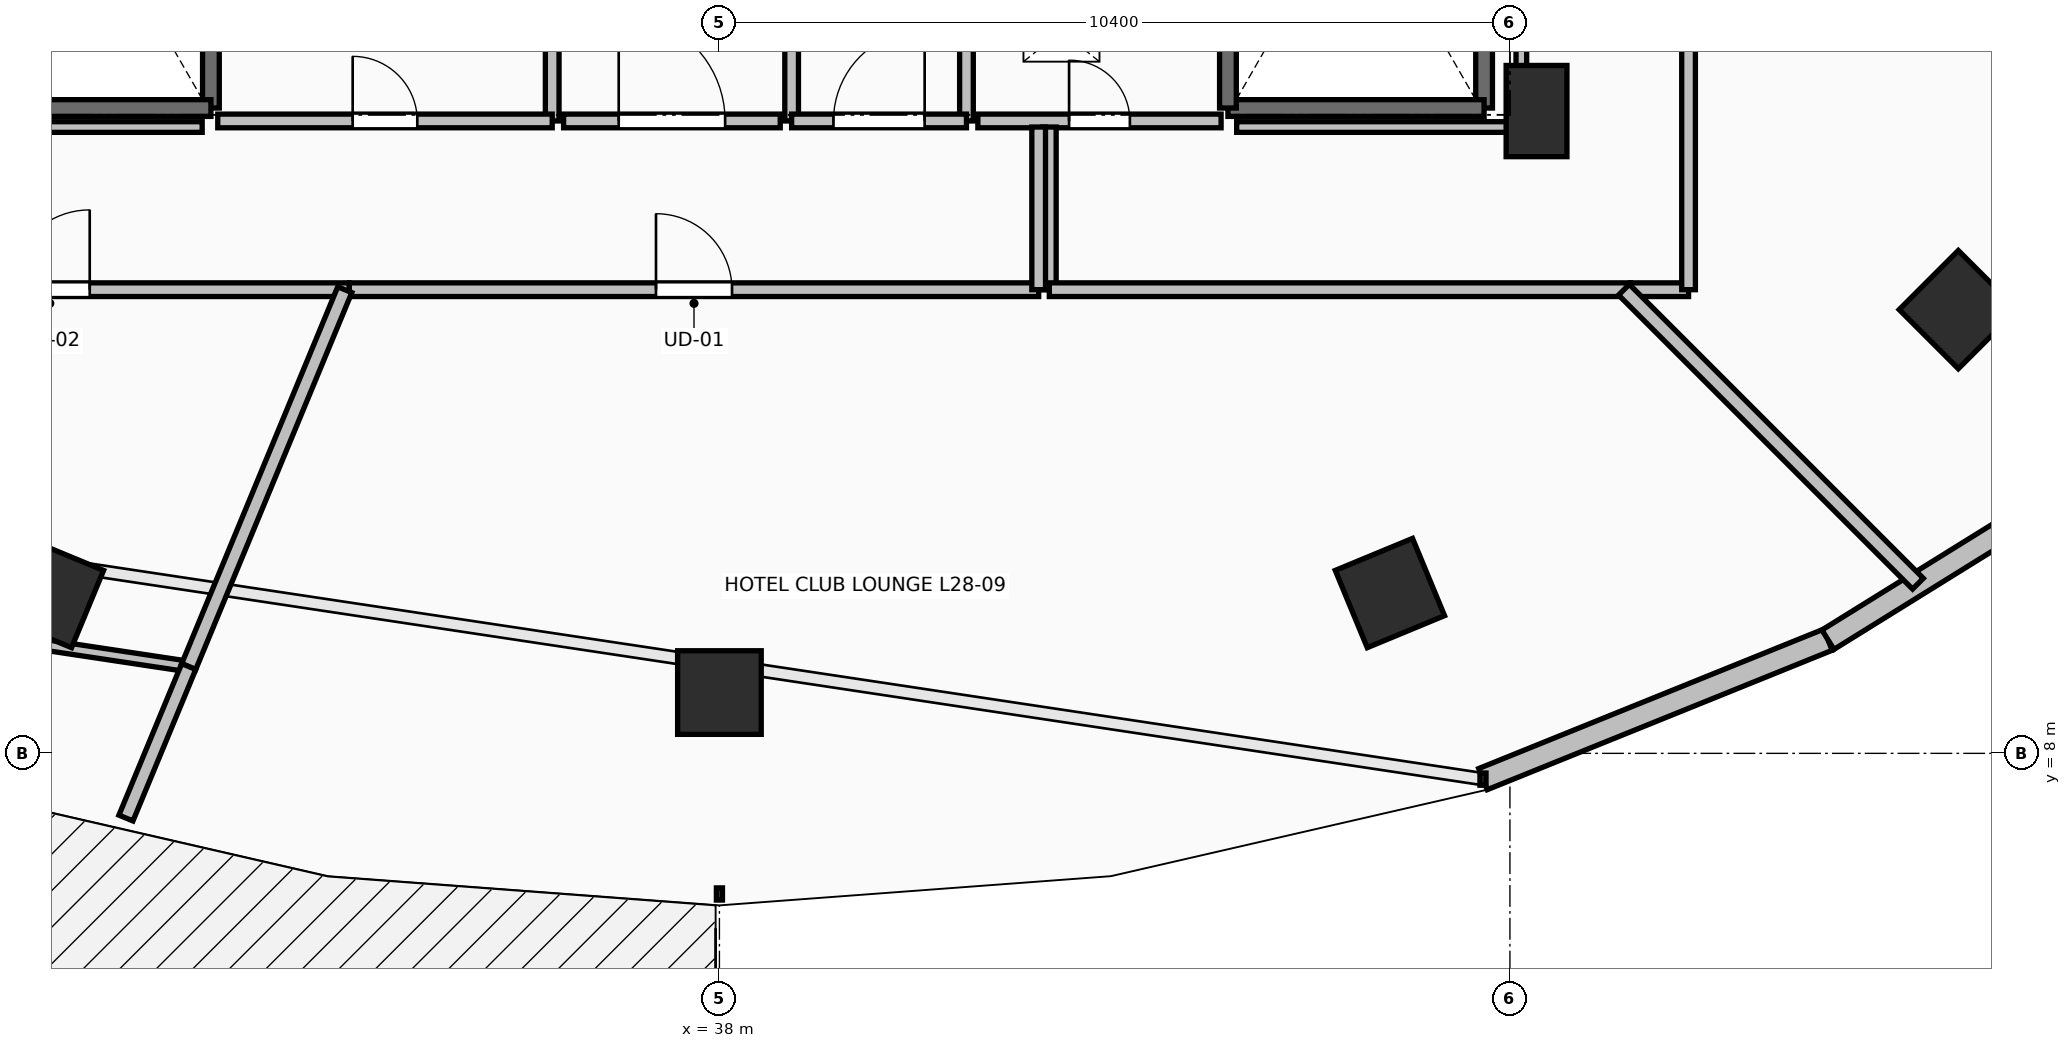
"""IFC4 building model, lengths in metres.
Left out: names, types, materials, properties, quantities, classifications, styles, units other than length and angle.
Written with IfcOpenShell. Run it as: python <this file> out.ifc"""

import sys

from ifc_helpers import new_model, si_unit, direction, frame, frame_2d, origin, origin_2d, place, context, subcontext, project, spatial, rectangle, extrude, element, fill, save


model = new_model("IFC4")
c1 = context("Model", 3, precision=1e-05, world=origin(), true_north=direction((0.0, 1.0)))
c2 = subcontext(c1, "Body", "Model", "MODEL_VIEW")
j1 = project(units=[si_unit("LENGTHUNIT", "METRE"), si_unit("PLANEANGLEUNIT", "RADIAN")], contexts=[c1])
p1 = place(None, origin())
s1 = spatial("IfcSite", under=j1, at=p1, CompositionType="ELEMENT")
p2 = place(p1, origin())
s2 = spatial("IfcBuilding", under=s1, at=p2, CompositionType="ELEMENT")
p3 = place(p2, frame((0.0, 0.0, 106.8)))
s3 = spatial("IfcBuildingStorey", under=s2, at=p3, CompositionType="ELEMENT", Elevation=106.8)
for number, where, z_axis, x_axis in (
    (1, (29.179, 10.109, 0.0), (0.0, 0.0, 1.0), (-0.383, -0.924, 0.0)),
    (2, (38.0, 8.8, 0.0), (0.0, 0.0, 1.0), (0.0, -1.0, 0.0)),
    (3, (46.821, 10.109, 0.0), (0.0, 0.0, 1.0), (0.383, -0.924, 0.0)),
    (4, (54.299, 13.838, 0.0), (0.0, 0.0, 1.0), (0.707, -0.707, 0.0)),
):
    element("IfcColumn", number, at=place(p3, frame(where, z_axis=z_axis, x_axis=x_axis)), inside=s3, PredefinedType="COLUMN", context=c2, shape_type="SweptSolid", body=[
        extrude(rectangle(XDim=1.1, YDim=1.1, at=origin_2d()), origin(), (0.0, 0.0, 1.0), 3.5),
    ])
p4 = place(p3, frame((48.75, 16.45, 0.0), z_axis=(0.0, 0.0, 1.0), x_axis=(1.0, 0.0, 0.0)))
e5 = element("IfcColumn", 5, at=p4, inside=s3, PredefinedType="PILASTER", context=c2, shape_type="SweptSolid", body=[
    extrude(rectangle(XDim=0.8, YDim=1.2, at=origin_2d()), origin(), (0.0, 0.0, 1.0), 3.5),
])
p5 = place(p3, frame((48.045, 7.661, 0.0), z_axis=(0.0, 0.0, 1.0), x_axis=(0.927122233109, 0.374759075775, 0.0)))
e6 = element("IfcWall", 6, at=p5, inside=s3, PredefinedType="STANDARD", context=c2, shape_type="SweptSolid", body=[
    extrude(rectangle(XDim=4.895, YDim=0.3, at=frame_2d((2.448, 0.0))), origin(), (0.0, 0.0, 1.0), 3.24),
])
p6 = place(p3, frame((52.584, 9.495, 0.0), z_axis=(0.0, 0.0, 1.0), x_axis=(0.849684479743, 0.527291461038, 0.0)))
e7 = element("IfcWall", 7, at=p6, inside=s3, PredefinedType="STANDARD", context=c2, shape_type="SweptSolid", body=[
    extrude(rectangle(XDim=4.681, YDim=0.3, at=frame_2d((2.341, 0.0))), origin(), (0.0, 0.0, 1.0), 3.24),
])
p7 = place(p3, frame((31.31, 23.91, 0.0), z_axis=(0.0, 0.0, 1.0), x_axis=(0.0, -1.0, 0.0)))
e8 = element("IfcWall", 8, at=p7, inside=s3, PredefinedType="SOLIDWALL", context=c2, shape_type="SweptSolid", body=[
    extrude(rectangle(XDim=7.42, YDim=0.22, at=frame_2d((3.71, 0.0))), origin(), (0.0, 0.0, 1.0), 3.24),
])
p8 = place(p3, frame((31.31, 16.49, 0.0), z_axis=(0.0, 0.0, 1.0), x_axis=(-1.0, 0.0, 0.0)))
e9 = element("IfcWall", 9, at=p8, inside=s3, PredefinedType="SOLIDWALL", context=c2, shape_type="SweptSolid", body=[
    extrude(rectangle(XDim=3.37, YDim=0.22, at=frame_2d((1.685, 0.0))), origin(), (0.0, 0.0, 1.0), 3.24),
])
p9 = place(p3, frame((48.06, 23.91, 0.0), z_axis=(0.0, 0.0, 1.0), x_axis=(0.0, -1.0, 0.0)))
e10 = element("IfcWall", 10, at=p9, inside=s3, PredefinedType="SOLIDWALL", context=c2, shape_type="SweptSolid", body=[
    extrude(rectangle(XDim=7.42, YDim=0.22, at=frame_2d((3.71, 0.0))), origin(), (0.0, 0.0, 1.0), 3.24),
])
p10 = place(p3, frame((48.06, 16.49, 0.0), z_axis=(0.0, 0.0, 1.0), x_axis=(-1.0, 0.0, 0.0)))
e11 = element("IfcWall", 11, at=p10, inside=s3, PredefinedType="SOLIDWALL", context=c2, shape_type="SweptSolid", body=[
    extrude(rectangle(XDim=3.37, YDim=0.22, at=frame_2d((1.685, 0.0))), origin(), (0.0, 0.0, 1.0), 3.24),
])
p11 = place(p3, frame((44.69, 16.49, 0.0), z_axis=(0.0, 0.0, 1.0), x_axis=(0.0, 1.0, 0.0)))
e12 = element("IfcWall", 12, at=p11, inside=s3, PredefinedType="SOLIDWALL", context=c2, shape_type="SweptSolid", body=[
    extrude(rectangle(XDim=7.42, YDim=0.22, at=frame_2d((3.71, 0.0))), origin(), (0.0, 0.0, 1.0), 3.24),
])
p12 = place(p3, frame((41.25, 16.32, 0.0), z_axis=(0.0, 0.0, 1.0), x_axis=(0.0, 1.0, 0.0)))
e13 = element("IfcWall", 13, at=p12, inside=s3, PredefinedType="PARTITIONING", context=c2, shape_type="SweptSolid", body=[
    extrude(rectangle(XDim=3.985, YDim=0.18, at=frame_2d((1.992, 0.0))), origin(), (0.0, 0.0, 1.0), 3.24),
])
p13 = place(p12, frame((1.593, 0.0, 0.0)))
e14 = element("IfcOpeningElement", 14, at=p13, cuts=e13, PredefinedType="OPENING", context=c2, shape_type="SweptSolid", body=[
    extrude(rectangle(XDim=0.8, YDim=2.05, at=frame_2d((0.4, 1.025))), frame((0.0, 0.105, 0.0), z_axis=(0.0, -1.0, 0.0), x_axis=(1.0, 0.0, 0.0)), (0.0, 0.0, 1.0), 0.21),
])
p14 = place(p3, frame((38.95, 21.755, 0.0), z_axis=(0.0, 0.0, 1.0), x_axis=(0.0, -1.0, 0.0)))
e15 = element("IfcWall", 15, at=p14, inside=s3, PredefinedType="PARTITIONING", context=c2, shape_type="SweptSolid", body=[
    extrude(rectangle(XDim=5.435, YDim=0.18, at=frame_2d((2.717, 0.0))), origin(), (0.0, 0.0, 1.0), 3.24),
])
p15 = place(p14, frame((2.018, 0.0, 0.0)))
e16 = element("IfcOpeningElement", 16, at=p15, cuts=e15, PredefinedType="OPENING", context=c2, shape_type="SweptSolid", body=[
    extrude(rectangle(XDim=1.4, YDim=2.2, at=frame_2d((0.7, 1.1))), frame((0.0, 0.105, 0.0), z_axis=(0.0, -1.0, 0.0), x_axis=(1.0, 0.0, 0.0)), (0.0, 0.0, 1.0), 0.21),
])
p16 = place(p3, frame((38.95, 16.32, 0.0), z_axis=(0.0, 0.0, 1.0), x_axis=(1.0, 0.0, 0.0)))
e17 = element("IfcWall", 17, at=p16, inside=s3, PredefinedType="PARTITIONING", context=c2, shape_type="SweptSolid", body=[
    extrude(rectangle(XDim=2.3, YDim=0.18, at=frame_2d((1.15, 0.0))), origin(), (0.0, 0.0, 1.0), 3.24),
])
p17 = place(p16, frame((0.55, 0.0, 0.0)))
e18 = element("IfcOpeningElement", 18, at=p17, cuts=e17, PredefinedType="OPENING", context=c2, shape_type="SweptSolid", body=[
    extrude(rectangle(XDim=1.2, YDim=2.15, at=frame_2d((0.6, 1.075))), frame((0.0, 0.105, 0.0), z_axis=(0.0, -1.0, 0.0), x_axis=(1.0, 0.0, 0.0)), (0.0, 0.0, 1.0), 0.21),
])
p18 = place(p3, frame((41.4, 16.32, 0.0), z_axis=(0.0, 0.0, 1.0), x_axis=(1.0, 0.0, 0.0)))
e19 = element("IfcWall", 19, at=p18, inside=s3, PredefinedType="PARTITIONING", context=c2, shape_type="SweptSolid", body=[
    extrude(rectangle(XDim=3.2, YDim=0.18, at=frame_2d((1.6, 0.0))), origin(), (0.0, 0.0, 1.0), 3.24),
])
p19 = place(p18, frame((1.2, 0.0, 0.0)))
e20 = element("IfcOpeningElement", 20, at=p19, cuts=e19, PredefinedType="OPENING", context=c2, shape_type="SweptSolid", body=[
    extrude(rectangle(XDim=0.8, YDim=2.05, at=frame_2d((0.4, 1.025))), frame((0.0, 0.105, 0.0), z_axis=(0.0, -1.0, 0.0), x_axis=(1.0, 0.0, 0.0)), (0.0, 0.0, 1.0), 0.21),
])
p20 = place(p3, frame((35.8, 16.32, 0.0), z_axis=(0.0, 0.0, 1.0), x_axis=(0.0, 1.0, 0.0)))
e21 = element("IfcWall", 21, at=p20, inside=s3, PredefinedType="PARTITIONING", context=c2, shape_type="SweptSolid", body=[
    extrude(rectangle(XDim=5.13, YDim=0.18, at=frame_2d((2.565, 0.0))), origin(), (0.0, 0.0, 1.0), 3.24),
])
p21 = place(p3, frame((31.4, 16.32, 0.0), z_axis=(0.0, 0.0, 1.0), x_axis=(1.0, 0.0, 0.0)))
e22 = element("IfcWall", 22, at=p21, inside=s3, PredefinedType="PARTITIONING", context=c2, shape_type="SweptSolid", body=[
    extrude(rectangle(XDim=4.4, YDim=0.18, at=frame_2d((2.2, 0.0))), origin(), (0.0, 0.0, 1.0), 3.24),
])
p22 = place(p21, frame((1.775, 0.0, 0.0)))
e23 = element("IfcOpeningElement", 23, at=p22, cuts=e22, PredefinedType="OPENING", context=c2, shape_type="SweptSolid", body=[
    extrude(rectangle(XDim=0.85, YDim=2.1, at=frame_2d((0.425, 1.05))), frame((0.0, 0.105, 0.0), z_axis=(0.0, -1.0, 0.0), x_axis=(1.0, 0.0, 0.0)), (0.0, 0.0, 1.0), 0.21),
])
p23 = place(p3, frame((35.95, 16.32, 0.0), z_axis=(0.0, 0.0, 1.0), x_axis=(1.0, 0.0, 0.0)))
e24 = element("IfcWall", 24, at=p23, inside=s3, PredefinedType="PARTITIONING", context=c2, shape_type="SweptSolid", body=[
    extrude(rectangle(XDim=2.85, YDim=0.18, at=frame_2d((1.425, 0.0))), origin(), (0.0, 0.0, 1.0), 3.24),
])
p24 = place(p23, frame((0.725, 0.0, 0.0)))
e25 = element("IfcOpeningElement", 25, at=p24, cuts=e24, PredefinedType="OPENING", context=c2, shape_type="SweptSolid", body=[
    extrude(rectangle(XDim=1.4, YDim=2.2, at=frame_2d((0.7, 1.1))), frame((0.0, 0.105, 0.0), z_axis=(0.0, -1.0, 0.0), x_axis=(1.0, 0.0, 0.0)), (0.0, 0.0, 1.0), 0.21),
])
p25 = place(p3, frame((25.25, 14.1, 0.0), z_axis=(0.0, 0.0, 1.0), x_axis=(1.0, 0.0, 0.0)))
e26 = element("IfcWall", 26, at=p25, inside=s3, PredefinedType="PARTITIONING", context=c2, shape_type="SweptSolid", body=[
    extrude(rectangle(XDim=7.881, YDim=0.18, at=frame_2d((3.94, 0.0))), origin(), (0.0, 0.0, 1.0), 2.432),
])
p26 = place(p25, frame((3.416, 0.0, 0.0)))
e27 = element("IfcOpeningElement", 27, at=p26, cuts=e26, PredefinedType="OPENING", context=c2, shape_type="SweptSolid", body=[
    extrude(rectangle(XDim=1.05, YDim=2.2, at=frame_2d((0.525, 1.1))), frame((0.0, 0.105, 0.0), z_axis=(0.0, -1.0, 0.0), x_axis=(1.0, 0.0, 0.0)), (0.0, 0.0, 1.0), 0.21),
])
p27 = place(p3, frame((42.34, 16.24, 0.0), z_axis=(0.0, 0.0, 1.0), x_axis=(0.0, -1.0, 0.0)))
e28 = element("IfcWall", 28, at=p27, inside=s3, PredefinedType="PARTITIONING", context=c2, shape_type="SweptSolid", body=[
    extrude(rectangle(XDim=2.14, YDim=0.18, at=frame_2d((1.07, 0.0))), origin(), (0.0, 0.0, 1.0), 3.24),
])
p28 = place(p3, frame((42.34, 14.1, 0.0), z_axis=(0.0, 0.0, 1.0), x_axis=(1.0, 0.0, 0.0)))
e29 = element("IfcWall", 29, at=p28, inside=s3, PredefinedType="PARTITIONING", context=c2, shape_type="SweptSolid", body=[
    extrude(rectangle(XDim=7.645, YDim=0.18, at=frame_2d((3.823, 0.0))), origin(), (0.0, 0.0, 1.0), 2.432),
])
p29 = place(p3, frame((33.131, 14.1, 0.0), z_axis=(0.0, 0.0, 1.0), x_axis=(1.0, 0.0, 0.0)))
e30 = element("IfcWall", 30, at=p29, inside=s3, PredefinedType="PARTITIONING", context=c2, shape_type="SweptSolid", body=[
    extrude(rectangle(XDim=9.069, YDim=0.18, at=frame_2d((4.534, 0.0))), origin(), (0.0, 0.0, 1.0), 2.886),
])
p30 = place(p29, frame((4.034, 0.0, 0.0)))
e31 = element("IfcOpeningElement", 31, at=p30, cuts=e30, PredefinedType="OPENING", context=c2, shape_type="SweptSolid", body=[
    extrude(rectangle(XDim=1.0, YDim=2.15, at=frame_2d((0.5, 1.075))), frame((0.0, 0.105, 0.0), z_axis=(0.0, -1.0, 0.0), x_axis=(1.0, 0.0, 0.0)), (0.0, 0.0, 1.0), 0.21),
])
p31 = place(p3, frame((42.2, 14.1, 0.0), z_axis=(0.0, 0.0, 1.0), x_axis=(0.0, 1.0, 0.0)))
e32 = element("IfcWall", 32, at=p31, inside=s3, PredefinedType="PARTITIONING", context=c2, shape_type="SweptSolid", body=[
    extrude(rectangle(XDim=2.14, YDim=0.18, at=frame_2d((1.07, 0.0))), origin(), (0.0, 0.0, 1.0), 3.24),
])
p32 = place(p3, frame((49.985, 14.1, 0.0), z_axis=(0.0, 0.0, 1.0), x_axis=(1.0, 0.0, 0.0)))
e33 = element("IfcWall", 33, at=p32, inside=s3, PredefinedType="PARTITIONING", context=c2, shape_type="SweptSolid", body=[
    extrude(rectangle(XDim=0.765, YDim=0.18, at=frame_2d((0.382, 0.0))), origin(), (0.0, 0.0, 1.0), 2.972),
])
p33 = place(p3, frame((50.75, 14.1, 0.0), z_axis=(0.0, 0.0, 1.0), x_axis=(0.0, 1.0, 0.0)))
e34 = element("IfcWall", 34, at=p33, inside=s3, PredefinedType="PARTITIONING", context=c2, shape_type="SweptSolid", body=[
    extrude(rectangle(XDim=16.981, YDim=0.18, at=frame_2d((8.49, 0.0))), origin(), (0.0, 0.0, 1.0), 2.432),
])
p34 = place(p33, frame((7.99, 0.0, 0.0)))
e35 = element("IfcOpeningElement", 35, at=p34, cuts=e34, PredefinedType="OPENING", context=c2, shape_type="SweptSolid", body=[
    extrude(rectangle(XDim=1.0, YDim=2.15, at=frame_2d((0.5, 1.075))), frame((0.0, 0.105, 0.0), z_axis=(0.0, -1.0, 0.0), x_axis=(1.0, 0.0, 0.0)), (0.0, 0.0, 1.0), 0.21),
])
p35 = place(p3, frame((28.938, 9.455, 0.0), z_axis=(0.0, 0.0, 1.0), x_axis=(0.988868142427, -0.148794478708, 0.0)))
e36 = element("IfcWall", 36, at=p35, inside=s3, PredefinedType="PARTITIONING", context=c2, shape_type="SweptSolid", body=[
    extrude(rectangle(XDim=2.104, YDim=0.14, at=frame_2d((1.052, 0.0))), origin(), (0.0, 0.0, 1.0), 3.24),
])
p36 = place(p3, frame((31.018, 9.142, 0.0), z_axis=(0.0, 0.0, 1.0), x_axis=(0.382572793579, 0.923925352836, 0.0)))
e37 = element("IfcWall", 37, at=p36, inside=s3, PredefinedType="PARTITIONING", context=c2, shape_type="SweptSolid", body=[
    extrude(rectangle(XDim=5.366, YDim=0.2, at=frame_2d((2.683, 0.0))), origin(), (0.0, 0.0, 1.0), 2.677),
])
p37 = place(p3, frame((30.192, 7.149, 0.0), z_axis=(0.0, 0.0, 1.0), x_axis=(0.382911401564, 0.923785071622, 0.0)))
e38 = element("IfcWall", 38, at=p37, inside=s3, PredefinedType="PARTITIONING", context=c2, shape_type="SweptSolid", body=[
    extrude(rectangle(XDim=2.158, YDim=0.2, at=frame_2d((1.079, 0.0))), origin(), (0.0, 0.0, 1.0), 3.24),
])
p38 = place(p3, frame((53.768, 10.232, 0.0), z_axis=(0.0, 0.0, 1.0), x_axis=(-0.707106781187, 0.707106781187, 0.0)))
e39 = element("IfcWall", 39, at=p38, inside=s3, PredefinedType="PARTITIONING", context=c2, shape_type="SweptSolid", body=[
    extrude(rectangle(XDim=5.47, YDim=0.2, at=frame_2d((2.735, 0.0))), origin(), (0.0, 0.0, 1.0), 2.677),
])
p39 = place(p3, frame((48.55, 23.754, 0.0), z_axis=(0.0, 0.0, 1.0), x_axis=(0.0, -1.0, 0.0)))
e40 = element("IfcWall", 40, at=p39, inside=s3, PredefinedType="PARTITIONING", context=c2, shape_type="SweptSolid", body=[
    extrude(rectangle(XDim=7.514, YDim=0.14, at=frame_2d((3.757, 0.0))), origin(), (0.0, 0.0, 1.0), 2.432),
])
for number, where, z_axis, x_axis in (
    (41, (48.55, 16.24, 0.0), (0.0, 0.0, 1.0), (-1.0, 0.0, 0.0)),
    (42, (31.195, 16.24, 0.0), (0.0, 0.0, 1.0), (-1.0, 0.0, 0.0)),
):
    element("IfcWall", number, at=place(p3, frame(where, z_axis=z_axis, x_axis=x_axis)), inside=s3, PredefinedType="PARTITIONING", context=c2, shape_type="SweptSolid", body=[
        extrude(rectangle(XDim=3.745, YDim=0.14, at=frame_2d((1.873, 0.0))), origin(), (0.0, 0.0, 1.0), 2.432),
    ])
p40 = place(p17, origin())
e43 = element("IfcDoor", 43, at=p40, inside=s3, OperationType="SINGLE_SWING_RIGHT", PredefinedType="DOOR", context=c2, shape_type="SweptSolid", body=[
    extrude(rectangle(XDim=1.2, YDim=2.15, at=frame_2d((0.6, 1.075))), frame((0.0, 0.025, 0.0), z_axis=(0.0, -1.0, 0.0), x_axis=(1.0, 0.0, 0.0)), (0.0, 0.0, 1.0), 0.05),
])
fill(e18, e43)
p41 = place(p19, origin())
e44 = element("IfcDoor", 44, at=p41, inside=s3, OperationType="SINGLE_SWING_LEFT", PredefinedType="DOOR", context=c2, shape_type="SweptSolid", body=[
    extrude(rectangle(XDim=0.8, YDim=2.05, at=frame_2d((0.4, 1.025))), frame((0.0, 0.025, 0.0), z_axis=(0.0, -1.0, 0.0), x_axis=(1.0, 0.0, 0.0)), (0.0, 0.0, 1.0), 0.05),
])
fill(e20, e44)
p42 = place(p22, origin())
e45 = element("IfcDoor", 45, at=p42, inside=s3, OperationType="SINGLE_SWING_LEFT", PredefinedType="DOOR", context=c2, shape_type="SweptSolid", body=[
    extrude(rectangle(XDim=0.85, YDim=2.1, at=frame_2d((0.425, 1.05))), frame((0.0, 0.025, 0.0), z_axis=(0.0, -1.0, 0.0), x_axis=(1.0, 0.0, 0.0)), (0.0, 0.0, 1.0), 0.05),
])
fill(e23, e45)
p43 = place(p24, origin())
e46 = element("IfcDoor", 46, at=p43, inside=s3, OperationType="DOUBLE_SWING_LEFT", PredefinedType="DOOR", context=c2, shape_type="SweptSolid", body=[
    extrude(rectangle(XDim=1.4, YDim=2.2, at=frame_2d((0.7, 1.1))), frame((0.0, 0.025, 0.0), z_axis=(0.0, -1.0, 0.0), x_axis=(1.0, 0.0, 0.0)), (0.0, 0.0, 1.0), 0.05),
])
fill(e25, e46)
p44 = place(p26, origin())
e47 = element("IfcDoor", 47, at=p44, inside=s3, OperationType="SINGLE_SWING_RIGHT", PredefinedType="DOOR", context=c2, shape_type="SweptSolid", body=[
    extrude(rectangle(XDim=1.05, YDim=2.2, at=frame_2d((0.525, 1.1))), frame((0.0, 0.025, 0.0), z_axis=(0.0, -1.0, 0.0), x_axis=(1.0, 0.0, 0.0)), (0.0, 0.0, 1.0), 0.05),
])
fill(e27, e47)
p45 = place(p30, origin())
e48 = element("IfcDoor", 48, at=p45, inside=s3, OperationType="SINGLE_SWING_LEFT", PredefinedType="DOOR", context=c2, shape_type="SweptSolid", body=[
    extrude(rectangle(XDim=1.0, YDim=2.15, at=frame_2d((0.5, 1.075))), frame((0.0, 0.025, 0.0), z_axis=(0.0, -1.0, 0.0), x_axis=(1.0, 0.0, 0.0)), (0.0, 0.0, 1.0), 0.05),
])
fill(e31, e48)
save(model, sys.argv[1])
